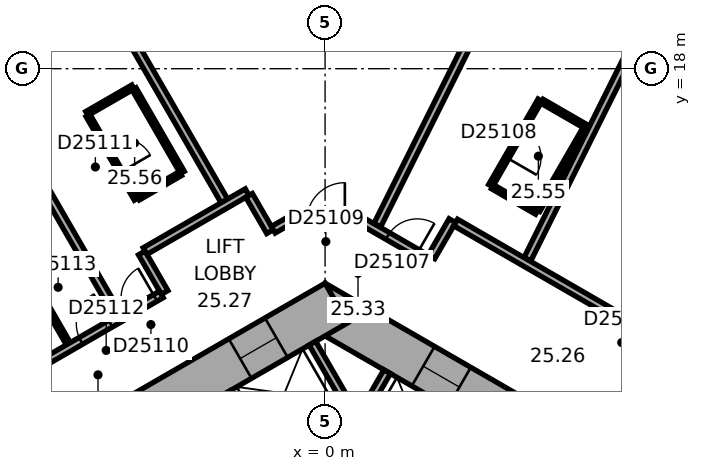
"""IFC4 building model, lengths in metres.
Left out: names, types, materials, properties, quantities, classifications, styles, units other than length and angle.
Written with IfcOpenShell. Run it as: python <this file> out.ifc"""

import sys

from ifc_helpers import new_model, si_unit, direction, frame, frame_2d, origin, place, context, subcontext, project, spatial, rectangle, extrude, element, fill, save


model = new_model("IFC4")
c1 = context("Model", 3, precision=1e-05, world=origin(), true_north=direction((0.0, 1.0)))
c2 = subcontext(c1, "Body", "Model", "MODEL_VIEW")
j1 = project(units=[si_unit("LENGTHUNIT", "METRE"), si_unit("PLANEANGLEUNIT", "RADIAN")], contexts=[c1])
p1 = place(None, origin())
s1 = spatial("IfcSite", under=j1, at=p1, CompositionType="ELEMENT")
p2 = place(p1, origin())
s2 = spatial("IfcBuilding", under=s1, at=p2, CompositionType="ELEMENT")
p3 = place(p2, frame((0.0, 0.0, 106.7)))
s3 = spatial("IfcBuildingStorey", under=s2, at=p3, CompositionType="ELEMENT", Elevation=106.7)
p4 = place(p3, frame((10.4, 5.658, 0.0), z_axis=(0.0, 0.0, 1.0), x_axis=(-0.866021384402, 0.500006961711, 0.0)))
e1 = element("IfcWall", 1, at=p4, inside=s3, PredefinedType="SHEAR", context=c2, shape_type="SweptSolid", body=[
    extrude(rectangle(XDim=12.355, YDim=1.2, at=frame_2d((6.178, 0.0))), origin(), (0.0, 0.0, 1.0), 3.3),
])
p5 = place(p4, frame((2.728, 0.0, 0.0)))
e2 = element("IfcOpeningElement", 2, at=p5, cuts=e1, PredefinedType="OPENING", context=c2, shape_type="SweptSolid", body=[
    extrude(rectangle(XDim=1.1, YDim=2.1, at=frame_2d((0.55, 1.05))), frame((0.0, 0.61, 0.0), z_axis=(0.0, -1.0, 0.0), x_axis=(1.0, 0.0, 0.0)), (0.0, 0.0, 1.0), 1.22),
])
p6 = place(p4, frame((5.328, 0.0, 0.0)))
e3 = element("IfcOpeningElement", 3, at=p6, cuts=e1, PredefinedType="OPENING", context=c2, shape_type="SweptSolid", body=[
    extrude(rectangle(XDim=1.1, YDim=2.1, at=frame_2d((0.55, 1.05))), frame((0.0, 0.61, 0.0), z_axis=(0.0, -1.0, 0.0), x_axis=(1.0, 0.0, 0.0)), (0.0, 0.0, 1.0), 1.22),
])
p7 = place(p4, frame((7.928, 0.0, 0.0)))
e4 = element("IfcOpeningElement", 4, at=p7, cuts=e1, PredefinedType="OPENING", context=c2, shape_type="SweptSolid", body=[
    extrude(rectangle(XDim=1.1, YDim=2.1, at=frame_2d((0.55, 1.05))), frame((0.0, 0.61, 0.0), z_axis=(0.0, -1.0, 0.0), x_axis=(1.0, 0.0, 0.0)), (0.0, 0.0, 1.0), 1.22),
])
p8 = place(p3, frame((0.3, 11.836, 0.0), z_axis=(0.0, 0.0, 1.0), x_axis=(-0.866021384402, -0.500006961711, 0.0)))
e5 = element("IfcWall", 5, at=p8, inside=s3, PredefinedType="SHEAR", context=c2, shape_type="SweptSolid", body=[
    extrude(rectangle(XDim=12.355, YDim=1.2, at=frame_2d((6.178, 0.0))), origin(), (0.0, 0.0, 1.0), 3.3),
])
p9 = place(p8, frame((6.378, 0.0, 0.0)))
e6 = element("IfcOpeningElement", 6, at=p9, cuts=e5, PredefinedType="OPENING", context=c2, shape_type="SweptSolid", body=[
    extrude(rectangle(XDim=1.5, YDim=2.1, at=frame_2d((0.75, 1.05))), frame((0.0, 0.61, 0.0), z_axis=(0.0, -1.0, 0.0), x_axis=(1.0, 0.0, 0.0)), (0.0, 0.0, 1.0), 1.22),
])
p10 = place(p8, frame((1.828, 0.0, 0.0)))
e7 = element("IfcOpeningElement", 7, at=p10, cuts=e5, PredefinedType="OPENING", context=c2, shape_type="SweptSolid", body=[
    extrude(rectangle(XDim=1.1, YDim=2.1, at=frame_2d((0.55, 1.05))), frame((0.0, 0.61, 0.0), z_axis=(0.0, -1.0, 0.0), x_axis=(1.0, 0.0, 0.0)), (0.0, 0.0, 1.0), 1.22),
])
p11 = place(p3, frame((20.63, 15.47, 0.0), z_axis=(0.0, 0.0, 1.0), x_axis=(-0.894934518609, 0.446197498203, 0.0)))
e8 = element("IfcWall", 8, at=p11, inside=s3, PredefinedType="STANDARD", context=c2, shape_type="SweptSolid", body=[
    extrude(rectangle(XDim=21.246, YDim=0.2, at=frame_2d((10.623, 0.0))), origin(), (0.0, 0.0, 1.0), 3.3),
])
p12 = place(p11, frame((1.553, 0.0, 0.8)))
e9 = element("IfcOpeningElement", 9, at=p12, cuts=e8, PredefinedType="OPENING", context=c2, shape_type="SweptSolid", body=[
    extrude(rectangle(XDim=2.4, YDim=1.7, at=frame_2d((1.2, 0.85))), frame((0.0, 0.11, 0.0), z_axis=(0.0, -1.0, 0.0), x_axis=(1.0, 0.0, 0.0)), (0.0, 0.0, 1.0), 0.22),
])
p13 = place(p11, frame((5.488, 0.0, 0.8)))
e10 = element("IfcOpeningElement", 10, at=p13, cuts=e8, PredefinedType="OPENING", context=c2, shape_type="SweptSolid", body=[
    extrude(rectangle(XDim=2.4, YDim=1.7, at=frame_2d((1.2, 0.85))), frame((0.0, 0.11, 0.0), z_axis=(0.0, -1.0, 0.0), x_axis=(1.0, 0.0, 0.0)), (0.0, 0.0, 1.0), 0.22),
])
p14 = place(p11, frame((9.422, 0.0, 0.8)))
e11 = element("IfcOpeningElement", 11, at=p14, cuts=e8, PredefinedType="OPENING", context=c2, shape_type="SweptSolid", body=[
    extrude(rectangle(XDim=2.4, YDim=1.7, at=frame_2d((1.2, 0.85))), frame((0.0, 0.11, 0.0), z_axis=(0.0, -1.0, 0.0), x_axis=(1.0, 0.0, 0.0)), (0.0, 0.0, 1.0), 0.22),
])
p15 = place(p11, frame((13.357, 0.0, 0.8)))
e12 = element("IfcOpeningElement", 12, at=p15, cuts=e8, PredefinedType="OPENING", context=c2, shape_type="SweptSolid", body=[
    extrude(rectangle(XDim=2.4, YDim=1.7, at=frame_2d((1.2, 0.85))), frame((0.0, 0.11, 0.0), z_axis=(0.0, -1.0, 0.0), x_axis=(1.0, 0.0, 0.0)), (0.0, 0.0, 1.0), 0.22),
])
p16 = place(p11, frame((17.292, 0.0, 0.8)))
e13 = element("IfcOpeningElement", 13, at=p16, cuts=e8, PredefinedType="OPENING", context=c2, shape_type="SweptSolid", body=[
    extrude(rectangle(XDim=2.4, YDim=1.7, at=frame_2d((1.2, 0.85))), frame((0.0, 0.11, 0.0), z_axis=(0.0, -1.0, 0.0), x_axis=(1.0, 0.0, 0.0)), (0.0, 0.0, 1.0), 0.22),
])
p17 = place(p3, frame((-3.136, 24.805, 0.0), z_axis=(0.0, 0.0, 1.0), x_axis=(-0.866028291626, -0.499994998079, 0.0)))
e14 = element("IfcWall", 14, at=p17, inside=s3, PredefinedType="STANDARD", context=c2, shape_type="SweptSolid", body=[
    extrude(rectangle(XDim=21.246, YDim=0.2, at=frame_2d((10.623, 0.0))), origin(), (0.0, 0.0, 1.0), 3.3),
])
p18 = place(p17, frame((1.555, 0.0, 0.8)))
e15 = element("IfcOpeningElement", 15, at=p18, cuts=e14, PredefinedType="OPENING", context=c2, shape_type="SweptSolid", body=[
    extrude(rectangle(XDim=2.4, YDim=1.7, at=frame_2d((1.2, 0.85))), frame((0.0, 0.11, 0.0), z_axis=(0.0, -1.0, 0.0), x_axis=(1.0, 0.0, 0.0)), (0.0, 0.0, 1.0), 0.22),
])
p19 = place(p17, frame((5.489, 0.0, 0.8)))
e16 = element("IfcOpeningElement", 16, at=p19, cuts=e14, PredefinedType="OPENING", context=c2, shape_type="SweptSolid", body=[
    extrude(rectangle(XDim=2.4, YDim=1.7, at=frame_2d((1.2, 0.85))), frame((0.0, 0.11, 0.0), z_axis=(0.0, -1.0, 0.0), x_axis=(1.0, 0.0, 0.0)), (0.0, 0.0, 1.0), 0.22),
])
p20 = place(p17, frame((9.424, 0.0, 0.8)))
e17 = element("IfcOpeningElement", 17, at=p20, cuts=e14, PredefinedType="OPENING", context=c2, shape_type="SweptSolid", body=[
    extrude(rectangle(XDim=2.4, YDim=1.7, at=frame_2d((1.2, 0.85))), frame((0.0, 0.11, 0.0), z_axis=(0.0, -1.0, 0.0), x_axis=(1.0, 0.0, 0.0)), (0.0, 0.0, 1.0), 0.22),
])
p21 = place(p17, frame((13.358, 0.0, 0.8)))
e18 = element("IfcOpeningElement", 18, at=p21, cuts=e14, PredefinedType="OPENING", context=c2, shape_type="SweptSolid", body=[
    extrude(rectangle(XDim=2.4, YDim=1.7, at=frame_2d((1.2, 0.85))), frame((0.0, 0.11, 0.0), z_axis=(0.0, -1.0, 0.0), x_axis=(1.0, 0.0, 0.0)), (0.0, 0.0, 1.0), 0.22),
])
p22 = place(p17, frame((17.293, 0.0, 0.8)))
e19 = element("IfcOpeningElement", 19, at=p22, cuts=e14, PredefinedType="OPENING", context=c2, shape_type="SweptSolid", body=[
    extrude(rectangle(XDim=2.4, YDim=1.7, at=frame_2d((1.2, 0.85))), frame((0.0, 0.11, 0.0), z_axis=(0.0, -1.0, 0.0), x_axis=(1.0, 0.0, 0.0)), (0.0, 0.0, 1.0), 0.22),
])
p23 = place(p3, frame((0.532, 8.122, 0.0), z_axis=(0.0, 0.0, 1.0), x_axis=(0.500077893725, 0.86598042715, 0.0)))
e20 = element("IfcWall", 20, at=p23, inside=s3, PredefinedType="PARTITIONING", context=c2, shape_type="SweptSolid", body=[
    extrude(rectangle(XDim=2.2, YDim=0.2, at=frame_2d((1.1, 0.0))), origin(), (0.0, 0.0, 1.0), 3.05),
])
p24 = place(p3, frame((0.767, 8.872, 0.0), z_axis=(0.0, 0.0, 1.0), x_axis=(-0.499994660107, 0.866028486751, 0.0)))
e21 = element("IfcWall", 21, at=p24, inside=s3, PredefinedType="PARTITIONING", context=c2, shape_type="SweptSolid", body=[
    extrude(rectangle(XDim=2.2, YDim=0.2, at=frame_2d((1.1, 0.0))), origin(), (0.0, 0.0, 1.0), 3.05),
])
p25 = place(p3, frame((-1.485, 7.572, 0.0), z_axis=(0.0, 0.0, 1.0), x_axis=(-0.50002983664, 0.866008176907, 0.0)))
e22 = element("IfcWall", 22, at=p25, inside=s3, PredefinedType="PARTITIONING", context=c2, shape_type="SweptSolid", body=[
    extrude(rectangle(XDim=2.2, YDim=0.2, at=frame_2d((1.1, 0.0))), origin(), (0.0, 0.0, 1.0), 3.05),
])
p26 = place(p3, frame((-10.083, 19.524, 0.0), z_axis=(0.0, 0.0, 1.0), x_axis=(0.499999662836, -0.866025598446, 0.0)))
e23 = element("IfcWall", 23, at=p26, inside=s3, PredefinedType="PARTITIONING", context=c2, shape_type="SweptSolid", body=[
    extrude(rectangle(XDim=9.25, YDim=0.2, at=frame_2d((4.625, 0.0))), origin(), (0.0, 0.0, 1.0), 2.6),
])
p27 = place(p3, frame((-8.177, 13.223, 0.0), z_axis=(0.0, 0.0, 1.0), x_axis=(0.500087089641, -0.865975116718, 0.0)))
e24 = element("IfcWall", 24, at=p27, inside=s3, PredefinedType="PARTITIONING", context=c2, shape_type="SweptSolid", body=[
    extrude(rectangle(XDim=2.84, YDim=0.12, at=frame_2d((1.42, 0.0))), origin(), (0.0, 0.0, 1.0), 3.05),
])
p28 = place(p27, frame((0.97, 0.0, 0.0)))
e25 = element("IfcOpeningElement", 25, at=p28, cuts=e24, PredefinedType="OPENING", context=c2, shape_type="SweptSolid", body=[
    extrude(rectangle(XDim=0.9, YDim=2.1, at=frame_2d((0.45, 1.05))), frame((0.0, 0.07, 0.0), z_axis=(0.0, -1.0, 0.0), x_axis=(1.0, 0.0, 0.0)), (0.0, 0.0, 1.0), 0.14),
])
p29 = place(p3, frame((-6.676, 21.492, 0.0), z_axis=(0.0, 0.0, 1.0), x_axis=(0.500011263043, -0.866018900966, 0.0)))
e26 = element("IfcWall", 26, at=p29, inside=s3, PredefinedType="PARTITIONING", context=c2, shape_type="SweptSolid", body=[
    extrude(rectangle(XDim=8.049, YDim=0.2, at=frame_2d((4.024, 0.0))), origin(), (0.0, 0.0, 1.0), 3.05),
])
p30 = place(p3, frame((-6.268, 16.82, 0.0), z_axis=(0.0, 0.0, 1.0), x_axis=(0.866002662425, 0.500039387122, 0.0)))
e27 = element("IfcWall", 27, at=p30, inside=s3, PredefinedType="PARTITIONING", context=c2, shape_type="SweptSolid", body=[
    extrude(rectangle(XDim=1.4, YDim=0.12, at=frame_2d((0.7, 0.0))), origin(), (0.0, 0.0, 1.0), 3.05),
])
p31 = place(p3, frame((-5.026, 17.469, 0.0), z_axis=(0.0, 0.0, 1.0), x_axis=(0.500005339912, -0.866022320763, 0.0)))
e28 = element("IfcWall", 28, at=p31, inside=s3, PredefinedType="PARTITIONING", context=c2, shape_type="SweptSolid", body=[
    extrude(rectangle(XDim=2.54, YDim=0.12, at=frame_2d((1.27, 0.0))), origin(), (0.0, 0.0, 1.0), 3.05),
])
p32 = place(p3, frame((-4.968, 14.569, 0.0), z_axis=(0.0, 0.0, 1.0), x_axis=(-0.500046963369, 0.865998287773, 0.0)))
e29 = element("IfcWall", 29, at=p32, inside=s3, PredefinedType="PARTITIONING", context=c2, shape_type="SweptSolid", body=[
    extrude(rectangle(XDim=2.54, YDim=0.12, at=frame_2d((1.27, 0.0))), origin(), (0.0, 0.0, 1.0), 3.05),
])
p33 = place(p32, frame((0.82, 0.0, 0.0)))
e30 = element("IfcOpeningElement", 30, at=p33, cuts=e29, PredefinedType="OPENING", context=c2, shape_type="SweptSolid", body=[
    extrude(rectangle(XDim=0.9, YDim=2.1, at=frame_2d((0.45, 1.05))), frame((0.0, 0.07, 0.0), z_axis=(0.0, -1.0, 0.0), x_axis=(1.0, 0.0, 0.0)), (0.0, 0.0, 1.0), 0.14),
])
p34 = place(p3, frame((-4.823, 13.152, 0.0), z_axis=(0.0, 0.0, 1.0), x_axis=(0.499986357472, -0.866033280158, 0.0)))
e31 = element("IfcWall", 31, at=p34, inside=s3, PredefinedType="PARTITIONING", context=c2, shape_type="SweptSolid", body=[
    extrude(rectangle(XDim=1.201, YDim=0.2, at=frame_2d((0.601, 0.0))), origin(), (0.0, 0.0, 1.0), 3.05),
])
p35 = place(p3, frame((-4.309, 12.061, 0.0), z_axis=(0.0, 0.0, 1.0), x_axis=(-0.866020679205, -0.500008183122, 0.0)))
e32 = element("IfcWall", 32, at=p35, inside=s3, PredefinedType="PARTITIONING", context=c2, shape_type="SweptSolid", body=[
    extrude(rectangle(XDim=5.104, YDim=0.2, at=frame_2d((2.552, 0.0))), origin(), (0.0, 0.0, 1.0), 3.05),
])
p36 = place(p35, frame((0.185, 0.0, 0.0)))
e33 = element("IfcOpeningElement", 33, at=p36, cuts=e32, PredefinedType="OPENING", context=c2, shape_type="SweptSolid", body=[
    extrude(rectangle(XDim=0.9, YDim=2.1, at=frame_2d((0.45, 1.05))), frame((0.0, 0.11, 0.0), z_axis=(0.0, -1.0, 0.0), x_axis=(1.0, 0.0, 0.0)), (0.0, 0.0, 1.0), 0.22),
])
p37 = place(p35, frame((1.544, 0.0, 0.0)))
e34 = element("IfcOpeningElement", 34, at=p37, cuts=e32, PredefinedType="OPENING", context=c2, shape_type="SweptSolid", body=[
    extrude(rectangle(XDim=0.9, YDim=2.1, at=frame_2d((0.45, 1.05))), frame((0.0, 0.11, 0.0), z_axis=(0.0, -1.0, 0.0), x_axis=(1.0, 0.0, 0.0)), (0.0, 0.0, 1.0), 0.22),
])
p38 = place(p3, frame((-3.808, 15.239, 0.0), z_axis=(0.0, 0.0, 1.0), x_axis=(-0.866087136806, -0.499893060024, 0.0)))
e35 = element("IfcWall", 35, at=p38, inside=s3, PredefinedType="PARTITIONING", context=c2, shape_type="SweptSolid", body=[
    extrude(rectangle(XDim=1.28, YDim=0.12, at=frame_2d((0.64, 0.0))), origin(), (0.0, 0.0, 1.0), 3.05),
])
p39 = place(p3, frame((-2.05, 14.752, 0.0), z_axis=(0.0, 0.0, 1.0), x_axis=(-0.866030936828, -0.499990416364, 0.0)))
e36 = element("IfcWall", 36, at=p39, inside=s3, PredefinedType="PARTITIONING", context=c2, shape_type="SweptSolid", body=[
    extrude(rectangle(XDim=3.102, YDim=0.2, at=frame_2d((1.551, 0.0))), origin(), (0.0, 0.0, 1.0), 3.05),
])
p40 = place(p3, frame((-1.449, 13.712, 0.0), z_axis=(0.0, 0.0, 1.0), x_axis=(-0.499978356969, 0.866037899034, 0.0)))
e37 = element("IfcWall", 37, at=p40, inside=s3, PredefinedType="PARTITIONING", context=c2, shape_type="SweptSolid", body=[
    extrude(rectangle(XDim=1.101, YDim=0.2, at=frame_2d((0.551, 0.0))), origin(), (0.0, 0.0, 1.0), 3.05),
])
p41 = place(p3, frame((-0.95, 14.001, 0.0), z_axis=(0.0, 0.0, 1.0), x_axis=(-0.86609177584, -0.499885022602, 0.0)))
e38 = element("IfcWall", 38, at=p41, inside=s3, PredefinedType="PARTITIONING", context=c2, shape_type="SweptSolid", body=[
    extrude(rectangle(XDim=0.477, YDim=0.2, at=frame_2d((0.238, 0.0))), origin(), (0.0, 0.0, 1.0), 3.05),
])
p42 = place(p3, frame((0.95, 14.001, 0.0), z_axis=(0.0, 0.0, 1.0), x_axis=(-1.0, 0.0, 0.0)))
e39 = element("IfcWall", 39, at=p42, inside=s3, PredefinedType="PARTITIONING", context=c2, shape_type="SweptSolid", body=[
    extrude(rectangle(XDim=1.86, YDim=0.2, at=frame_2d((0.93, 0.0))), origin(), (0.0, 0.0, 1.0), 3.05),
])
p43 = place(p42, frame((0.43, 0.0, 0.0)))
e40 = element("IfcOpeningElement", 40, at=p43, cuts=e39, PredefinedType="OPENING", context=c2, shape_type="SweptSolid", body=[
    extrude(rectangle(XDim=1.0, YDim=2.1, at=frame_2d((0.5, 1.05))), frame((0.0, 0.11, 0.0), z_axis=(0.0, -1.0, 0.0), x_axis=(1.0, 0.0, 0.0)), (0.0, 0.0, 1.0), 0.22),
])
p44 = place(p3, frame((2.748, 12.962, 0.0), z_axis=(0.0, 0.0, 1.0), x_axis=(-0.866013897511, 0.50001992892, 0.0)))
e41 = element("IfcWall", 41, at=p44, inside=s3, PredefinedType="PARTITIONING", context=c2, shape_type="SweptSolid", body=[
    extrude(rectangle(XDim=2.037, YDim=0.2, at=frame_2d((1.018, 0.0))), origin(), (0.0, 0.0, 1.0), 3.05),
])
p45 = place(p44, frame((0.372, 0.0, 0.0)))
e42 = element("IfcOpeningElement", 42, at=p45, cuts=e41, PredefinedType="OPENING", context=c2, shape_type="SweptSolid", body=[
    extrude(rectangle(XDim=0.9, YDim=2.1, at=frame_2d((0.45, 1.05))), frame((0.0, 0.11, 0.0), z_axis=(0.0, -1.0, 0.0), x_axis=(1.0, 0.0, 0.0)), (0.0, 0.0, 1.0), 0.22),
])
p46 = place(p3, frame((3.349, 14.002, 0.0), z_axis=(0.0, 0.0, 1.0), x_axis=(-0.500074377092, -0.865982457891, 0.0)))
e43 = element("IfcWall", 43, at=p46, inside=s3, PredefinedType="PARTITIONING", context=c2, shape_type="SweptSolid", body=[
    extrude(rectangle(XDim=1.101, YDim=0.2, at=frame_2d((0.55, 0.0))), origin(), (0.0, 0.0, 1.0), 3.05),
])
p47 = place(p3, frame((4.356, 14.922, 0.0), z_axis=(0.0, 0.0, 1.0), x_axis=(0.499936506574, 0.866062058628, 0.0)))
e44 = element("IfcWall", 44, at=p47, inside=s3, PredefinedType="PARTITIONING", context=c2, shape_type="SweptSolid", body=[
    extrude(rectangle(XDim=2.6, YDim=0.12, at=frame_2d((1.3, 0.0))), origin(), (0.0, 0.0, 1.0), 3.05),
])
p48 = place(p47, frame((0.85, 0.0, 0.0)))
e45 = element("IfcOpeningElement", 45, at=p48, cuts=e44, PredefinedType="OPENING", context=c2, shape_type="SweptSolid", body=[
    extrude(rectangle(XDim=0.9, YDim=2.1, at=frame_2d((0.45, 1.05))), frame((0.0, 0.07, 0.0), z_axis=(0.0, -1.0, 0.0), x_axis=(1.0, 0.0, 0.0)), (0.0, 0.0, 1.0), 0.14),
])
p49 = place(p3, frame((5.351, 21.859, 0.0), z_axis=(0.0, 0.0, 1.0), x_axis=(-0.446205309328, -0.894930624086, 0.0)))
e46 = element("IfcWall", 46, at=p49, inside=s3, PredefinedType="PARTITIONING", context=c2, shape_type="SweptSolid", body=[
    extrude(rectangle(XDim=8.913, YDim=0.2, at=frame_2d((4.457, 0.0))), origin(), (0.0, 0.0, 1.0), 2.6),
])
p50 = place(p3, frame((5.569, 14.222, 0.0), z_axis=(0.0, 0.0, 1.0), x_axis=(-0.866036909293, 0.499980071345, 0.0)))
e47 = element("IfcWall", 47, at=p50, inside=s3, PredefinedType="PARTITIONING", context=c2, shape_type="SweptSolid", body=[
    extrude(rectangle(XDim=1.34, YDim=0.12, at=frame_2d((0.67, 0.0))), origin(), (0.0, 0.0, 1.0), 3.05),
])
p51 = place(p3, frame((5.708, 17.144, 0.0), z_axis=(0.0, 0.0, 1.0), x_axis=(0.866082447003, -0.499901185229, 0.0)))
e48 = element("IfcWall", 48, at=p51, inside=s3, PredefinedType="PARTITIONING", context=c2, shape_type="SweptSolid", body=[
    extrude(rectangle(XDim=1.34, YDim=0.12, at=frame_2d((0.67, 0.0))), origin(), (0.0, 0.0, 1.0), 3.05),
])
p52 = place(p3, frame((6.839, 16.422, 0.0), z_axis=(0.0, 0.0, 1.0), x_axis=(-0.50000366821, -0.866023285932, 0.0)))
e49 = element("IfcWall", 49, at=p52, inside=s3, PredefinedType="PARTITIONING", context=c2, shape_type="SweptSolid", body=[
    extrude(rectangle(XDim=2.48, YDim=0.12, at=frame_2d((1.24, 0.0))), origin(), (0.0, 0.0, 1.0), 3.05),
])
p53 = place(p3, frame((8.872, 20.104, 0.0), z_axis=(0.0, 0.0, 1.0), x_axis=(-0.446218378653, -0.894924107706, 0.0)))
e50 = element("IfcWall", 50, at=p53, inside=s3, PredefinedType="PARTITIONING", context=c2, shape_type="SweptSolid", body=[
    extrude(rectangle(XDim=7.95, YDim=0.2, at=frame_2d((3.975, 0.0))), origin(), (0.0, 0.0, 1.0), 3.05),
])
p54 = place(p3, frame((10.885, 9.652, 0.0), z_axis=(0.0, 0.0, 1.0), x_axis=(-0.866033868542, 0.499985338323, 0.0)))
e51 = element("IfcWall", 51, at=p54, inside=s3, PredefinedType="PARTITIONING", context=c2, shape_type="SweptSolid", body=[
    extrude(rectangle(XDim=8.602, YDim=0.2, at=frame_2d((4.301, 0.0))), origin(), (0.0, 0.0, 1.0), 3.05),
])
p55 = place(p54, frame((2.739, 0.0, 0.0)))
e52 = element("IfcOpeningElement", 52, at=p55, cuts=e51, PredefinedType="OPENING", context=c2, shape_type="SweptSolid", body=[
    extrude(rectangle(XDim=1.0, YDim=2.1, at=frame_2d((0.5, 1.05))), frame((0.0, 0.11, 0.0), z_axis=(0.0, -1.0, 0.0), x_axis=(1.0, 0.0, 0.0)), (0.0, 0.0, 1.0), 0.22),
])
p56 = place(p7, origin())
e53 = element("IfcDoor", 53, at=p56, inside=s3, OperationType="DOUBLE_DOOR_SLIDING", PredefinedType="DOOR", context=c2, shape_type="SweptSolid", body=[
    extrude(rectangle(XDim=1.1, YDim=2.1, at=frame_2d((0.55, 1.05))), frame((0.0, 0.025, 0.0), z_axis=(0.0, -1.0, 0.0), x_axis=(1.0, 0.0, 0.0)), (0.0, 0.0, 1.0), 0.05),
])
fill(e4, e53)
p57 = place(p10, origin())
e54 = element("IfcDoor", 54, at=p57, inside=s3, OperationType="DOUBLE_DOOR_SLIDING", PredefinedType="DOOR", context=c2, shape_type="SweptSolid", body=[
    extrude(rectangle(XDim=1.1, YDim=2.1, at=frame_2d((0.55, 1.05))), frame((0.0, 0.025, 0.0), z_axis=(0.0, -1.0, 0.0), x_axis=(1.0, 0.0, 0.0)), (0.0, 0.0, 1.0), 0.05),
])
fill(e7, e54)
p58 = place(p55, origin())
e55 = element("IfcDoor", 55, at=p58, inside=s3, OperationType="SINGLE_SWING_LEFT", PredefinedType="DOOR", context=c2, shape_type="SweptSolid", body=[
    extrude(rectangle(XDim=1.0, YDim=2.1, at=frame_2d((0.5, 1.05))), frame((0.0, 0.025, 0.0), z_axis=(0.0, -1.0, 0.0), x_axis=(1.0, 0.0, 0.0)), (0.0, 0.0, 1.0), 0.05),
])
fill(e52, e55)
p59 = place(p45, origin())
e56 = element("IfcDoor", 56, at=p59, inside=s3, OperationType="SINGLE_SWING_LEFT", PredefinedType="DOOR", context=c2, shape_type="SweptSolid", body=[
    extrude(rectangle(XDim=0.9, YDim=2.1, at=frame_2d((0.45, 1.05))), frame((0.0, 0.025, 0.0), z_axis=(0.0, -1.0, 0.0), x_axis=(1.0, 0.0, 0.0)), (0.0, 0.0, 1.0), 0.05),
])
fill(e42, e56)
p60 = place(p48, origin())
e57 = element("IfcDoor", 57, at=p60, inside=s3, OperationType="SINGLE_SWING_LEFT", PredefinedType="DOOR", context=c2, shape_type="SweptSolid", body=[
    extrude(rectangle(XDim=0.9, YDim=2.1, at=frame_2d((0.45, 1.05))), frame((0.0, 0.025, 0.0), z_axis=(0.0, -1.0, 0.0), x_axis=(1.0, 0.0, 0.0)), (0.0, 0.0, 1.0), 0.05),
])
fill(e45, e57)
p61 = place(p43, origin())
e58 = element("IfcDoor", 58, at=p61, inside=s3, OperationType="SINGLE_SWING_LEFT", PredefinedType="DOOR", context=c2, shape_type="SweptSolid", body=[
    extrude(rectangle(XDim=1.0, YDim=2.1, at=frame_2d((0.5, 1.05))), frame((0.0, 0.025, 0.0), z_axis=(0.0, -1.0, 0.0), x_axis=(1.0, 0.0, 0.0)), (0.0, 0.0, 1.0), 0.05),
])
fill(e40, e58)
p62 = place(p36, origin())
e59 = element("IfcDoor", 59, at=p62, inside=s3, OperationType="SINGLE_SWING_LEFT", PredefinedType="DOOR", context=c2, shape_type="SweptSolid", body=[
    extrude(rectangle(XDim=0.9, YDim=2.1, at=frame_2d((0.45, 1.05))), frame((0.0, 0.025, 0.0), z_axis=(0.0, -1.0, 0.0), x_axis=(1.0, 0.0, 0.0)), (0.0, 0.0, 1.0), 0.05),
])
fill(e33, e59)
p63 = place(p33, origin())
e60 = element("IfcDoor", 60, at=p63, inside=s3, OperationType="SINGLE_SWING_LEFT", PredefinedType="DOOR", context=c2, shape_type="SweptSolid", body=[
    extrude(rectangle(XDim=0.9, YDim=2.1, at=frame_2d((0.45, 1.05))), frame((0.0, 0.025, 0.0), z_axis=(0.0, -1.0, 0.0), x_axis=(1.0, 0.0, 0.0)), (0.0, 0.0, 1.0), 0.05),
])
fill(e30, e60)
p64 = place(p37, origin())
e61 = element("IfcDoor", 61, at=p64, inside=s3, OperationType="SINGLE_SWING_LEFT", PredefinedType="DOOR", context=c2, shape_type="SweptSolid", body=[
    extrude(rectangle(XDim=0.9, YDim=2.1, at=frame_2d((0.45, 1.05))), frame((0.0, 0.025, 0.0), z_axis=(0.0, -1.0, 0.0), x_axis=(1.0, 0.0, 0.0)), (0.0, 0.0, 1.0), 0.05),
])
fill(e34, e61)
save(model, sys.argv[1])
